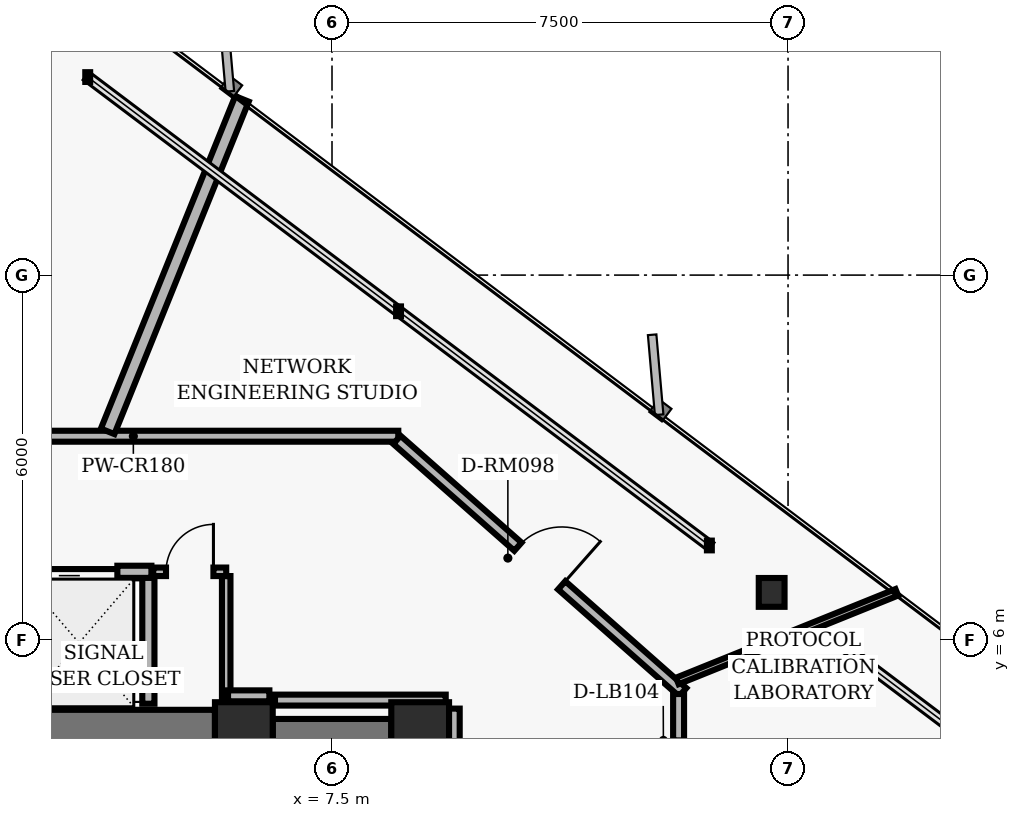
"""IFC4 building model, lengths in metres.
Left out: names, types, materials, properties, quantities, classifications, styles, units other than length and angle.
Written with IfcOpenShell. Run it as: python <this file> out.ifc"""

import sys

from ifc_helpers import new_model, si_unit, direction, frame, frame_2d, origin, origin_2d, place, context, subcontext, project, spatial, rectangle, hollow_rectangle, i_section, extrude, element, fill, save


model = new_model("IFC4")
c1 = context("Model", 3, precision=1e-05, world=origin(), true_north=direction((0.0, 1.0)))
c2 = subcontext(c1, "Body", "Model", "MODEL_VIEW")
j1 = project(units=[si_unit("LENGTHUNIT", "METRE"), si_unit("PLANEANGLEUNIT", "RADIAN")], contexts=[c1])
p1 = place(None, origin())
s1 = spatial("IfcSite", under=j1, at=p1, CompositionType="ELEMENT")
p2 = place(p1, origin())
s2 = spatial("IfcBuilding", under=s1, at=p2, CompositionType="ELEMENT")
p3 = place(p2, frame((0.0, 0.0, 52.96)))
s3 = spatial("IfcBuildingStorey", under=s2, at=p3, CompositionType="ELEMENT", Elevation=52.96)
for number, where, z_axis, x_axis in (
    (1, (6.05, 4.5, 0.0), (0.0, 0.0, 1.0), (1.0, 0.0, 0.0)),
    (2, (8.95, 4.5, 0.0), (0.0, 0.0, 1.0), (1.0, 0.0, 0.0)),
):
    element("IfcColumn", number, at=place(p3, frame(where, z_axis=z_axis, x_axis=x_axis)), inside=s3, PredefinedType="COLUMN", context=c2, shape_type="SweptSolid", body=[
        extrude(hollow_rectangle(XDim=0.95, YDim=0.95, WallThickness=0.06, InnerFilletRadius=0.02, OuterFilletRadius=0.04, at=origin_2d()), origin(), (0.0, 0.0, 1.0), 3.36),
    ])
p4 = place(p3, frame((2.05, 4.5, 0.0), z_axis=(0.0, 0.0, 1.0), x_axis=(1.0, 0.0, 0.0)))
e3 = element("IfcWall", 3, at=p4, inside=s3, PredefinedType="SHEAR", context=c2, shape_type="SweptSolid", body=[
    extrude(rectangle(XDim=3.525, YDim=0.7, at=frame_2d((1.762, 0.0))), origin(), (0.0, 0.0, 1.0), 3.098),
])
p5 = place(p3, frame((6.525, 4.5, 0.0), z_axis=(0.0, 0.0, 1.0), x_axis=(1.0, 0.0, 0.0)))
e4 = element("IfcWall", 4, at=p5, inside=s3, PredefinedType="SHEAR", context=c2, shape_type="SweptSolid", body=[
    extrude(rectangle(XDim=1.95, YDim=0.4, at=frame_2d((0.975, 0.0))), origin(), (0.0, 0.0, 1.0), 3.098),
])
p6 = place(p3, frame((14.73, 6.781, 0.0), z_axis=(0.0, 0.0, 1.0), x_axis=(1.0, 0.0, 0.0)))
e5 = element("IfcColumn", 5, at=p6, inside=s3, PredefinedType="COLUMN", context=c2, shape_type="SweptSolid", body=[
    extrude(i_section(OverallWidth=0.424, OverallDepth=0.474, WebThickness=0.048, FlangeThickness=0.077, FilletRadius=0.025, at=origin_2d()), origin(), (0.0, 0.0, 1.0), 3.36),
])
p7 = place(p3, frame((4.48, 4.95, 0.0), z_axis=(0.0, 0.0, 1.0), x_axis=(0.0, 1.0, 0.0)))
e6 = element("IfcWall", 6, at=p7, inside=s3, PredefinedType="PARTITIONING", context=c2, shape_type="SweptSolid", body=[
    extrude(rectangle(XDim=2.1, YDim=0.2, at=frame_2d((1.05, 0.0))), origin(), (0.0, 0.0, 1.0), 3.073),
])
p8 = place(p3, frame((2.15, 7.12, 0.0), z_axis=(0.0, 0.0, 1.0), x_axis=(1.0, 0.0, 0.0)))
e7 = element("IfcWall", 7, at=p8, inside=s3, PredefinedType="PARTITIONING", context=c2, shape_type="SweptSolid", body=[
    extrude(rectangle(XDim=2.38, YDim=0.2, at=frame_2d((1.19, 0.0))), origin(), (0.0, 0.0, 1.0), 2.587),
])
p9 = place(p8, frame((0.56, 0.0, 0.0)))
e8 = element("IfcOpeningElement", 8, at=p9, cuts=e7, PredefinedType="OPENING", context=c2, shape_type="SweptSolid", body=[
    extrude(rectangle(XDim=1.26, YDim=2.06, at=frame_2d((0.63, 1.03))), frame((0.0, 0.11, 0.0), z_axis=(0.0, -1.0, 0.0), x_axis=(1.0, 0.0, 0.0)), (0.0, 0.0, 1.0), 0.22),
])
p10 = place(p3, frame((5.76, 4.95, 0.0), z_axis=(0.0, 0.0, 1.0), x_axis=(0.0, 1.0, 0.0)))
e9 = element("IfcWall", 9, at=p10, inside=s3, PredefinedType="PARTITIONING", context=c2, shape_type="SweptSolid", body=[
    extrude(rectangle(XDim=2.1, YDim=0.14, at=frame_2d((1.05, 0.0))), origin(), (0.0, 0.0, 1.0), 3.073),
])
p11 = place(p3, frame((4.56, 7.12, 0.0), z_axis=(0.0, 0.0, 1.0), x_axis=(1.0, 0.0, 0.0)))
e10 = element("IfcWall", 10, at=p11, inside=s3, PredefinedType="PARTITIONING", context=c2, shape_type="SweptSolid", body=[
    extrude(rectangle(XDim=1.2, YDim=0.14, at=frame_2d((0.6, 0.0))), origin(), (0.0, 0.0, 1.0), 2.587),
])
p12 = place(p11, frame((0.21, 0.0, 0.0)))
e11 = element("IfcOpeningElement", 11, at=p12, cuts=e10, PredefinedType="OPENING", context=c2, shape_type="SweptSolid", body=[
    extrude(rectangle(XDim=0.78, YDim=2.01, at=frame_2d((0.39, 1.005))), frame((0.0, 0.08, 0.0), z_axis=(0.0, -1.0, 0.0), x_axis=(1.0, 0.0, 0.0)), (0.0, 0.0, 1.0), 0.16),
])
p13 = place(p3, frame((-8.59, 9.35, 0.0), z_axis=(0.0, 0.0, 1.0), x_axis=(1.0, 0.0, 0.0)))
e12 = element("IfcWall", 12, at=p13, inside=s3, PredefinedType="PARTITIONING", context=c2, shape_type="SweptSolid", body=[
    extrude(rectangle(XDim=17.18, YDim=0.18, at=frame_2d((8.59, 0.0))), origin(), (0.0, 0.0, 1.0), 3.073),
])
p14 = place(p13, frame((7.506, 0.0, 0.0)))
e13 = element("IfcOpeningElement", 13, at=p14, cuts=e12, PredefinedType="OPENING", context=c2, shape_type="SweptSolid", body=[
    extrude(rectangle(XDim=0.96, YDim=2.02, at=frame_2d((0.48, 1.01))), frame((0.0, 0.1, 0.0), z_axis=(0.0, -1.0, 0.0), x_axis=(1.0, 0.0, 0.0)), (0.0, 0.0, 1.0), 0.2),
])
p15 = place(p3, frame((8.567, 9.29, 0.0), z_axis=(0.0, 0.0, 1.0), x_axis=(0.749626463267, -0.66186113768, 0.0)))
e14 = element("IfcWall", 14, at=p15, inside=s3, PredefinedType="PARTITIONING", context=c2, shape_type="SweptSolid", body=[
    extrude(rectangle(XDim=6.27, YDim=0.18, at=frame_2d((3.135, 0.0))), origin(), (0.0, 0.0, 1.0), 2.587),
])
p16 = place(p15, frame((2.655, 0.0, 0.0)))
e15 = element("IfcOpeningElement", 15, at=p16, cuts=e14, PredefinedType="OPENING", context=c2, shape_type="SweptSolid", body=[
    extrude(rectangle(XDim=0.96, YDim=2.02, at=frame_2d((0.48, 1.01))), frame((0.0, 0.1, 0.0), z_axis=(0.0, -1.0, 0.0), x_axis=(1.0, 0.0, 0.0)), (0.0, 0.0, 1.0), 0.2),
])
p17 = place(p3, frame((13.2, 5.11, 0.0), z_axis=(0.0, 0.0, 1.0), x_axis=(0.0, -1.0, 0.0)))
e16 = element("IfcWall", 16, at=p17, inside=s3, PredefinedType="PARTITIONING", context=c2, shape_type="SweptSolid", body=[
    extrude(rectangle(XDim=10.22, YDim=0.18, at=frame_2d((5.11, 0.0))), origin(), (0.0, 0.0, 1.0), 3.073),
])
p18 = place(p17, frame((5.644, 0.0, 0.0)))
e17 = element("IfcOpeningElement", 17, at=p18, cuts=e16, PredefinedType="OPENING", context=c2, shape_type="SweptSolid", body=[
    extrude(rectangle(XDim=0.96, YDim=2.02, at=frame_2d((0.48, 1.01))), frame((0.0, 0.1, 0.0), z_axis=(0.0, -1.0, 0.0), x_axis=(1.0, 0.0, 0.0)), (0.0, 0.0, 1.0), 0.2),
])
p19 = place(p17, frame((0.763, 0.0, 0.0)))
e18 = element("IfcOpeningElement", 18, at=p19, cuts=e16, PredefinedType="OPENING", context=c2, shape_type="SweptSolid", body=[
    extrude(rectangle(XDim=1.02, YDim=2.02, at=frame_2d((0.51, 1.01))), frame((0.0, 0.1, 0.0), z_axis=(0.0, -1.0, 0.0), x_axis=(1.0, 0.0, 0.0)), (0.0, 0.0, 1.0), 0.2),
])
p20 = place(p3, frame((9.51, -4.87, 0.0), z_axis=(0.0, 0.0, 1.0), x_axis=(0.0, 1.0, 0.0)))
e19 = element("IfcWall", 19, at=p20, inside=s3, PredefinedType="PARTITIONING", context=c2, shape_type="SweptSolid", body=[
    extrude(rectangle(XDim=9.74, YDim=0.18, at=frame_2d((4.87, 0.0))), origin(), (0.0, 0.0, 1.0), 3.073),
])
p21 = place(p3, frame((9.37, 5.01, 0.0), z_axis=(0.0, 0.0, 1.0), x_axis=(-1.0, 0.0, 0.0)))
e20 = element("IfcWall", 20, at=p21, inside=s3, PredefinedType="PARTITIONING", context=c2, shape_type="SweptSolid", body=[
    extrude(rectangle(XDim=2.808, YDim=0.18, at=frame_2d((1.404, 0.0))), origin(), (0.0, 0.0, 1.0), 3.073),
])
p22 = place(p3, frame((6.47, 5.08, 0.0), z_axis=(0.0, 0.0, 1.0), x_axis=(-1.0, 0.0, 0.0)))
e21 = element("IfcWall", 21, at=p22, inside=s3, PredefinedType="PARTITIONING", context=c2, shape_type="SweptSolid", body=[
    extrude(rectangle(XDim=0.68, YDim=0.18, at=frame_2d((0.34, 0.0))), origin(), (0.0, 0.0, 1.0), 3.073),
])
p23 = place(p3, frame((13.179, 5.325, 0.0), z_axis=(0.0, 0.0, 1.0), x_axis=(0.927199532139, 0.374567787725, 0.0)))
e22 = element("IfcWall", 22, at=p23, inside=s3, PredefinedType="MOVABLE", context=c2, shape_type="SweptSolid", body=[
    extrude(rectangle(XDim=3.893, YDim=0.115, at=frame_2d((1.946, 0.0))), origin(), (0.0, 0.0, 1.0), 3.073),
])
p24 = place(p3, frame((3.81, 9.43, 0.0), z_axis=(0.0, 0.0, 1.0), x_axis=(0.374593091461, 0.927189309596, 0.0)))
e23 = element("IfcWall", 23, at=p24, inside=s3, PredefinedType="PARTITIONING", context=c2, shape_type="SweptSolid", body=[
    extrude(rectangle(XDim=5.898, YDim=0.24, at=frame_2d((2.949, 0.0))), origin(), (0.0, 0.0, 1.0), 3.073),
])
p25 = place(p9, origin())
e24 = element("IfcDoor", 24, at=p25, inside=s3, OperationType="SLIDING_TO_LEFT", PredefinedType="DOOR", context=c2, shape_type="SweptSolid", body=[
    extrude(rectangle(XDim=1.26, YDim=2.06, at=frame_2d((0.63, 1.03))), frame((0.0, 0.025, 0.0), z_axis=(0.0, -1.0, 0.0), x_axis=(1.0, 0.0, 0.0)), (0.0, 0.0, 1.0), 0.05),
])
fill(e8, e24)
p26 = place(p12, origin())
e25 = element("IfcDoor", 25, at=p26, inside=s3, OperationType="SINGLE_SWING_RIGHT", PredefinedType="DOOR", context=c2, shape_type="SweptSolid", body=[
    extrude(rectangle(XDim=0.78, YDim=2.01, at=frame_2d((0.39, 1.005))), frame((0.0, 0.025, 0.0), z_axis=(0.0, -1.0, 0.0), x_axis=(1.0, 0.0, 0.0)), (0.0, 0.0, 1.0), 0.05),
])
fill(e11, e25)
p27 = place(p16, origin())
e26 = element("IfcDoor", 26, at=p27, inside=s3, OperationType="SINGLE_SWING_RIGHT", PredefinedType="DOOR", context=c2, shape_type="SweptSolid", body=[
    extrude(rectangle(XDim=0.96, YDim=2.02, at=frame_2d((0.48, 1.01))), frame((0.0, 0.025, 0.0), z_axis=(0.0, -1.0, 0.0), x_axis=(1.0, 0.0, 0.0)), (0.0, 0.0, 1.0), 0.05),
])
fill(e15, e26)
save(model, sys.argv[1])
